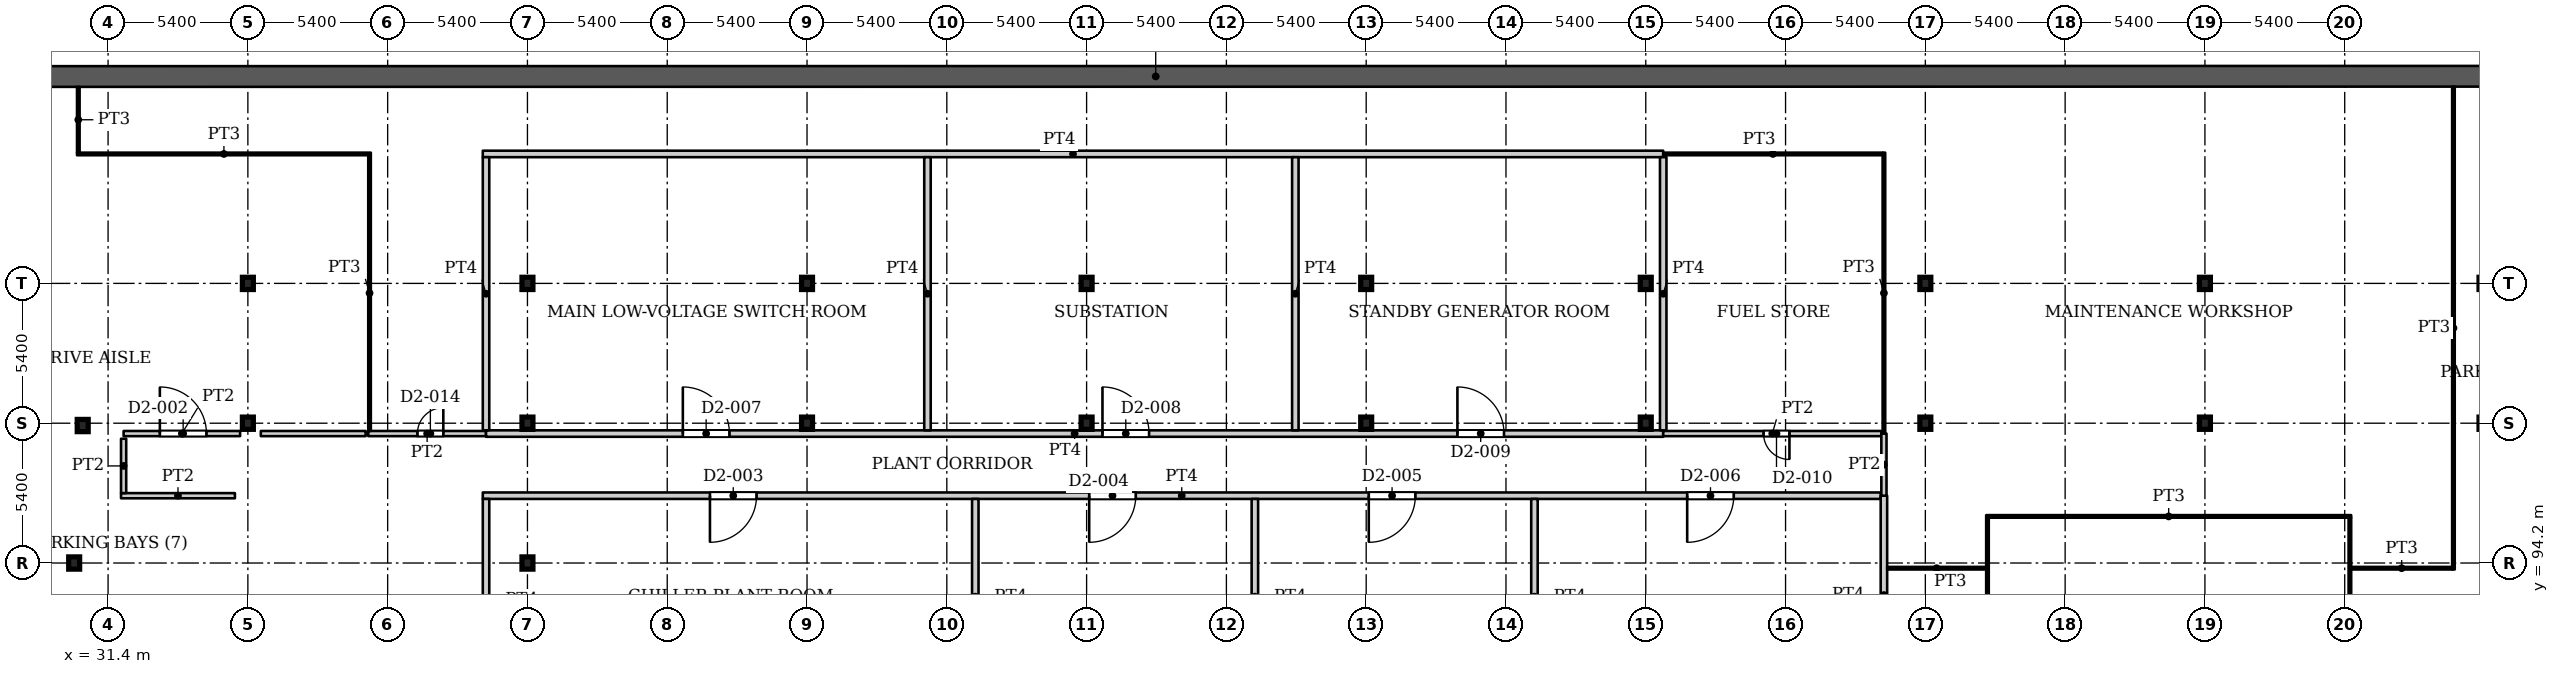
"""IFC4 building model, lengths in metres.
Left out: names, types, materials, properties, quantities, classifications, styles, units other than length and angle.
Written with IfcOpenShell. Run it as: python <this file> out.ifc"""

import sys

from ifc_helpers import new_model, si_unit, direction, frame, frame_2d, origin, origin_2d, place, context, subcontext, project, spatial, rectangle, i_section, extrude, source, transform, mapped, element, fill, save


model = new_model("IFC4")
c1 = context("Model", 3, precision=1e-05, world=origin(), true_north=direction((0.0, 1.0)))
c2 = subcontext(c1, "Body", "Model", "MODEL_VIEW")
j1 = project(units=[si_unit("LENGTHUNIT", "METRE"), si_unit("PLANEANGLEUNIT", "RADIAN")], contexts=[c1])
p1 = place(None, origin())
s1 = spatial("IfcSite", under=j1, at=p1, CompositionType="ELEMENT")
p2 = place(p1, origin())
s2 = spatial("IfcBuilding", under=s1, at=p2, CompositionType="ELEMENT")
p3 = place(p2, frame((0.0, 0.0, -10.0)))
s3 = spatial("IfcBuildingStorey", under=s2, at=p3, CompositionType="ELEMENT", Elevation=-10.0)
for number, where, z_axis, x_axis in (
    (1, (36.8, 99.6, 0.0), (0.0, 0.0, 1.0), (1.0, 0.0, 0.0)),
    (2, (47.6, 99.6, 0.0), (0.0, 0.0, 1.0), (1.0, 0.0, 0.0)),
    (3, (58.4, 99.6, 0.0), (0.0, 0.0, 1.0), (1.0, 0.0, 0.0)),
    (4, (69.2, 99.6, 0.0), (0.0, 0.0, 1.0), (1.0, 0.0, 0.0)),
    (5, (80.0, 99.6, 0.0), (0.0, 0.0, 1.0), (1.0, 0.0, 0.0)),
    (6, (90.8, 99.6, 0.0), (0.0, 0.0, 1.0), (1.0, 0.0, 0.0)),
    (7, (101.6, 99.6, 0.0), (0.0, 0.0, 1.0), (1.0, 0.0, 0.0)),
    (8, (112.4, 99.6, 0.0), (0.0, 0.0, 1.0), (1.0, 0.0, 0.0)),
    (9, (123.2, 99.6, 0.0), (0.0, 0.0, 1.0), (1.0, 0.0, 0.0)),
    (10, (36.8, 105.0, 0.0), (0.0, 0.0, 1.0), (1.0, 0.0, 0.0)),
    (11, (47.6, 105.0, 0.0), (0.0, 0.0, 1.0), (1.0, 0.0, 0.0)),
    (12, (58.4, 105.0, 0.0), (0.0, 0.0, 1.0), (1.0, 0.0, 0.0)),
    (13, (69.2, 105.0, 0.0), (0.0, 0.0, 1.0), (1.0, 0.0, 0.0)),
    (14, (80.0, 105.0, 0.0), (0.0, 0.0, 1.0), (1.0, 0.0, 0.0)),
    (15, (90.8, 105.0, 0.0), (0.0, 0.0, 1.0), (1.0, 0.0, 0.0)),
    (16, (101.6, 105.0, 0.0), (0.0, 0.0, 1.0), (1.0, 0.0, 0.0)),
    (17, (112.4, 105.0, 0.0), (0.0, 0.0, 1.0), (1.0, 0.0, 0.0)),
    (18, (123.2, 105.0, 0.0), (0.0, 0.0, 1.0), (1.0, 0.0, 0.0)),
    (19, (30.09, 94.2, 0.0), (0.0, 0.0, 1.0), (1.0, 0.0, 0.0)),
    (20, (47.6, 94.2, 0.0), (0.0, 0.0, 1.0), (1.0, 0.0, 0.0)),
    (21, (30.42, 99.51, 0.0), (0.0, 0.0, 1.0), (1.0, 0.0, 0.0)),
):
    element("IfcColumn", number, at=place(p3, frame(where, z_axis=z_axis, x_axis=x_axis)), inside=s3, PredefinedType="COLUMN", context=c2, shape_type="SweptSolid", body=[
        extrude(i_section(OverallWidth=0.424, OverallDepth=0.474, WebThickness=0.048, FlangeThickness=0.077, FilletRadius=0.014, at=origin_2d()), origin(), (0.0, 0.0, 1.0), 5.0),
    ])
p4 = place(p3, frame((17.739, 112.989, 0.0), z_axis=(0.0, 0.0, 1.0), x_axis=(0.999999994851, 0.000101480029, 0.0)))
e22 = element("IfcWall", 22, at=p4, inside=s3, PredefinedType="SOLIDWALL", context=c2, shape_type="SweptSolid", body=[
    extrude(rectangle(XDim=108.261, YDim=0.8, at=frame_2d((54.13, 0.0))), origin(), (0.0, 0.0, 1.0), 5.0),
])
p5 = place(p3, frame((30.2, 110.0, 0.0), z_axis=(0.0, 0.0, 1.0), x_axis=(1.0, 0.0, 0.0)))
e23 = element("IfcWall", 23, at=p5, inside=s3, PredefinedType="PARTITIONING", context=c2, shape_type="SweptSolid", body=[
    extrude(rectangle(XDim=11.35, YDim=0.1, at=frame_2d((5.675, 0.0))), origin(), (0.0, 0.0, 1.0), 4.58),
])
p6 = place(p3, frame((30.25, 110.05, 0.0), z_axis=(0.0, 0.0, 1.0), x_axis=(0.0, 1.0, 0.0)))
e24 = element("IfcWall", 24, at=p6, inside=s3, PredefinedType="PARTITIONING", context=c2, shape_type="SweptSolid", body=[
    extrude(rectangle(XDim=2.541, YDim=0.1, at=frame_2d((1.271, 0.0))), origin(), (0.0, 0.0, 1.0), 4.58),
])
p7 = place(p3, frame((31.9, 96.8, 0.0), z_axis=(0.0, 0.0, 1.0), x_axis=(1.0, 0.0, 0.0)))
e25 = element("IfcWall", 25, at=p7, inside=s3, PredefinedType="PARTITIONING", context=c2, shape_type="SweptSolid", body=[
    extrude(rectangle(XDim=4.4, YDim=0.2, at=frame_2d((2.2, 0.0))), origin(), (0.0, 0.0, 1.0), 4.58),
])
p8 = place(p3, frame((32.0, 96.9, 0.0), z_axis=(0.0, 0.0, 1.0), x_axis=(0.0, 1.0, 0.0)))
e26 = element("IfcWall", 26, at=p8, inside=s3, PredefinedType="PARTITIONING", context=c2, shape_type="SweptSolid", body=[
    extrude(rectangle(XDim=2.1, YDim=0.2, at=frame_2d((1.05, 0.0))), origin(), (0.0, 0.0, 1.0), 4.58),
])
p9 = place(p3, frame((32.0, 99.2, 0.0), z_axis=(0.0, 0.0, 1.0), x_axis=(1.0, 0.0, 0.0)))
e27 = element("IfcWall", 27, at=p9, inside=s3, PredefinedType="PARTITIONING", context=c2, shape_type="SweptSolid", body=[
    extrude(rectangle(XDim=4.5, YDim=0.2, at=frame_2d((2.25, 0.0))), origin(), (0.0, 0.0, 1.0), 4.58),
])
p10 = place(p9, frame((1.4, 0.0, 0.0)))
e28 = element("IfcOpeningElement", 28, at=p10, cuts=e27, PredefinedType="OPENING", context=c2, shape_type="SweptSolid", body=[
    extrude(rectangle(XDim=1.8, YDim=2.1, at=frame_2d((0.9, 1.05))), frame((0.0, 0.11, 0.0), z_axis=(0.0, -1.0, 0.0), x_axis=(1.0, 0.0, 0.0)), (0.0, 0.0, 1.0), 0.22),
])
p11 = place(p3, frame((37.3, 99.2, 0.0), z_axis=(0.0, 0.0, 1.0), x_axis=(1.0, 0.0, 0.0)))
e29 = element("IfcWall", 29, at=p11, inside=s3, PredefinedType="PARTITIONING", context=c2, shape_type="SweptSolid", body=[
    extrude(rectangle(XDim=4.05, YDim=0.2, at=frame_2d((2.025, 0.0))), origin(), (0.0, 0.0, 1.0), 4.58),
])
p12 = place(p3, frame((41.45, 99.2, 0.0), z_axis=(0.0, 0.0, 1.0), x_axis=(1.0, 0.0, 0.0)))
e30 = element("IfcWall", 30, at=p12, inside=s3, PredefinedType="PARTITIONING", context=c2, shape_type="SweptSolid", body=[
    extrude(rectangle(XDim=4.55, YDim=0.2, at=frame_2d((2.275, 0.0))), origin(), (0.0, 0.0, 1.0), 4.58),
])
p13 = place(p12, frame((1.9, 0.0, 0.0)))
e31 = element("IfcOpeningElement", 31, at=p13, cuts=e30, PredefinedType="OPENING", context=c2, shape_type="SweptSolid", body=[
    extrude(rectangle(XDim=1.0, YDim=2.1, at=frame_2d((0.5, 1.05))), frame((0.0, 0.11, 0.0), z_axis=(0.0, -1.0, 0.0), x_axis=(1.0, 0.0, 0.0)), (0.0, 0.0, 1.0), 0.22),
])
p14 = place(p3, frame((41.5, 99.3, 0.0), z_axis=(0.0, 0.0, 1.0), x_axis=(0.0, 1.0, 0.0)))
e32 = element("IfcWall", 32, at=p14, inside=s3, PredefinedType="PARTITIONING", context=c2, shape_type="SweptSolid", body=[
    extrude(rectangle(XDim=10.65, YDim=0.1, at=frame_2d((5.325, 0.0))), origin(), (0.0, 0.0, 1.0), 4.58),
])
p15 = place(p3, frame((45.875, 96.8, 0.0), z_axis=(0.0, 0.0, 1.0), x_axis=(1.0, 0.0, 0.0)))
e33 = element("IfcWall", 33, at=p15, inside=s3, PredefinedType="PARTITIONING", context=c2, shape_type="SweptSolid", body=[
    extrude(rectangle(XDim=54.0, YDim=0.25, at=frame_2d((27.0, 0.0))), origin(), (0.0, 0.0, 1.0), 4.58),
])
p16 = place(p15, frame((8.775, 0.0, 0.0)))
e34 = element("IfcOpeningElement", 34, at=p16, cuts=e33, PredefinedType="OPENING", context=c2, shape_type="SweptSolid", body=[
    extrude(rectangle(XDim=1.8, YDim=2.1, at=frame_2d((0.9, 1.05))), frame((0.0, 0.135, 0.0), z_axis=(0.0, -1.0, 0.0), x_axis=(1.0, 0.0, 0.0)), (0.0, 0.0, 1.0), 0.27),
])
p17 = place(p15, frame((23.425, 0.0, 0.0)))
e35 = element("IfcOpeningElement", 35, at=p17, cuts=e33, PredefinedType="OPENING", context=c2, shape_type="SweptSolid", body=[
    extrude(rectangle(XDim=1.8, YDim=2.1, at=frame_2d((0.9, 1.05))), frame((0.0, 0.135, 0.0), z_axis=(0.0, -1.0, 0.0), x_axis=(1.0, 0.0, 0.0)), (0.0, 0.0, 1.0), 0.27),
])
p18 = place(p15, frame((34.225, 0.0, 0.0)))
e36 = element("IfcOpeningElement", 36, at=p18, cuts=e33, PredefinedType="OPENING", context=c2, shape_type="SweptSolid", body=[
    extrude(rectangle(XDim=1.8, YDim=2.1, at=frame_2d((0.9, 1.05))), frame((0.0, 0.135, 0.0), z_axis=(0.0, -1.0, 0.0), x_axis=(1.0, 0.0, 0.0)), (0.0, 0.0, 1.0), 0.27),
])
p19 = place(p15, frame((46.525, 0.0, 0.0)))
e37 = element("IfcOpeningElement", 37, at=p19, cuts=e33, PredefinedType="OPENING", context=c2, shape_type="SweptSolid", body=[
    extrude(rectangle(XDim=1.8, YDim=2.1, at=frame_2d((0.9, 1.05))), frame((0.0, 0.135, 0.0), z_axis=(0.0, -1.0, 0.0), x_axis=(1.0, 0.0, 0.0)), (0.0, 0.0, 1.0), 0.27),
])
p20 = place(p3, frame((45.875, 110.0, 0.0), z_axis=(0.0, 0.0, 1.0), x_axis=(1.0, 0.0, 0.0)))
e38 = element("IfcWall", 38, at=p20, inside=s3, PredefinedType="PARTITIONING", context=c2, shape_type="SweptSolid", body=[
    extrude(rectangle(XDim=45.599, YDim=0.25, at=frame_2d((22.8, 0.0))), origin(), (0.0, 0.0, 1.0), 4.58),
])
p21 = place(p3, frame((46.0, 88.875, 0.0), z_axis=(0.0, 0.0, 1.0), x_axis=(0.0, 1.0, 0.0)))
e39 = element("IfcWall", 39, at=p21, inside=s3, PredefinedType="PARTITIONING", context=c2, shape_type="SweptSolid", body=[
    extrude(rectangle(XDim=7.8, YDim=0.25, at=frame_2d((3.9, 0.0))), origin(), (0.0, 0.0, 1.0), 4.58),
])
p22 = place(p3, frame((46.0, 99.2, 0.0), z_axis=(0.0, 0.0, 1.0), x_axis=(1.0, 0.0, 0.0)))
e40 = element("IfcWall", 40, at=p22, inside=s3, PredefinedType="PARTITIONING", context=c2, shape_type="SweptSolid", body=[
    extrude(rectangle(XDim=45.474, YDim=0.25, at=frame_2d((22.737, 0.0))), origin(), (0.0, 0.0, 1.0), 4.58),
])
p23 = place(p22, frame((7.603, 0.0, 0.0)))
e41 = element("IfcOpeningElement", 41, at=p23, cuts=e40, PredefinedType="OPENING", context=c2, shape_type="SweptSolid", body=[
    extrude(rectangle(XDim=1.8, YDim=2.1, at=frame_2d((0.9, 1.05))), frame((0.0, 0.135, 0.0), z_axis=(0.0, -1.0, 0.0), x_axis=(1.0, 0.0, 0.0)), (0.0, 0.0, 1.0), 0.27),
])
p24 = place(p22, frame((23.813, 0.0, 0.0)))
e42 = element("IfcOpeningElement", 42, at=p24, cuts=e40, PredefinedType="OPENING", context=c2, shape_type="SweptSolid", body=[
    extrude(rectangle(XDim=1.8, YDim=2.1, at=frame_2d((0.9, 1.05))), frame((0.0, 0.135, 0.0), z_axis=(0.0, -1.0, 0.0), x_axis=(1.0, 0.0, 0.0)), (0.0, 0.0, 1.0), 0.27),
])
p25 = place(p22, frame((37.524, 0.0, 0.0)))
e43 = element("IfcOpeningElement", 43, at=p25, cuts=e40, PredefinedType="OPENING", context=c2, shape_type="SweptSolid", body=[
    extrude(rectangle(XDim=1.8, YDim=2.1, at=frame_2d((0.9, 1.05))), frame((0.0, 0.135, 0.0), z_axis=(0.0, -1.0, 0.0), x_axis=(1.0, 0.0, 0.0)), (0.0, 0.0, 1.0), 0.27),
])
for number, where, z_axis, x_axis in (
    (44, (46.0, 99.325, 0.0), (0.0, 0.0, 1.0), (0.0, 1.0, 0.0)),
    (45, (63.053, 99.325, 0.0), (0.0, 0.0, 1.0), (0.0, 1.0, 0.0)),
):
    element("IfcWall", number, at=place(p3, frame(where, z_axis=z_axis, x_axis=x_axis)), inside=s3, PredefinedType="PARTITIONING", context=c2, shape_type="SweptSolid", body=[
        extrude(rectangle(XDim=10.55, YDim=0.25, at=frame_2d((5.275, 0.0))), origin(), (0.0, 0.0, 1.0), 4.58),
    ])
for number, where, z_axis, x_axis in (
    (46, (64.9, 89.125, 0.0), (0.0, 0.0, 1.0), (0.0, 1.0, 0.0)),
    (47, (75.7, 89.125, 0.0), (0.0, 0.0, 1.0), (0.0, 1.0, 0.0)),
):
    element("IfcWall", number, at=place(p3, frame(where, z_axis=z_axis, x_axis=x_axis)), inside=s3, PredefinedType="PARTITIONING", context=c2, shape_type="SweptSolid", body=[
        extrude(rectangle(XDim=7.55, YDim=0.25, at=frame_2d((3.775, 0.0))), origin(), (0.0, 0.0, 1.0), 4.58),
    ])
p26 = place(p3, frame((77.263, 99.325, 0.0), z_axis=(0.0, 0.0, 1.0), x_axis=(0.0, 1.0, 0.0)))
e48 = element("IfcWall", 48, at=p26, inside=s3, PredefinedType="PARTITIONING", context=c2, shape_type="SweptSolid", body=[
    extrude(rectangle(XDim=10.55, YDim=0.25, at=frame_2d((5.275, 0.0))), origin(), (0.0, 0.0, 1.0), 4.58),
])
p27 = place(p3, frame((86.5, 89.125, 0.0), z_axis=(0.0, 0.0, 1.0), x_axis=(0.0, 1.0, 0.0)))
e49 = element("IfcWall", 49, at=p27, inside=s3, PredefinedType="PARTITIONING", context=c2, shape_type="SweptSolid", body=[
    extrude(rectangle(XDim=7.55, YDim=0.25, at=frame_2d((3.775, 0.0))), origin(), (0.0, 0.0, 1.0), 4.58),
])
p28 = place(p3, frame((91.474, 99.2, 0.0), z_axis=(0.0, 0.0, 1.0), x_axis=(1.0, 0.0, 0.0)))
e50 = element("IfcWall", 50, at=p28, inside=s3, PredefinedType="PARTITIONING", context=c2, shape_type="SweptSolid", body=[
    extrude(rectangle(XDim=8.426, YDim=0.2, at=frame_2d((4.213, 0.0))), origin(), (0.0, 0.0, 1.0), 4.58),
])
p29 = place(p28, frame((3.876, 0.0, 0.0)))
e51 = element("IfcOpeningElement", 51, at=p29, cuts=e50, PredefinedType="OPENING", context=c2, shape_type="SweptSolid", body=[
    extrude(rectangle(XDim=1.0, YDim=2.1, at=frame_2d((0.5, 1.05))), frame((0.0, 0.11, 0.0), z_axis=(0.0, -1.0, 0.0), x_axis=(1.0, 0.0, 0.0)), (0.0, 0.0, 1.0), 0.22),
])
p30 = place(p3, frame((91.474, 99.325, 0.0), z_axis=(0.0, 0.0, 1.0), x_axis=(0.0, 1.0, 0.0)))
e52 = element("IfcWall", 52, at=p30, inside=s3, PredefinedType="PARTITIONING", context=c2, shape_type="SweptSolid", body=[
    extrude(rectangle(XDim=10.55, YDim=0.25, at=frame_2d((5.275, 0.0))), origin(), (0.0, 0.0, 1.0), 4.58),
])
p31 = place(p3, frame((91.474, 110.0, 0.0), z_axis=(0.0, 0.0, 1.0), x_axis=(1.0, 0.0, 0.0)))
e53 = element("IfcWall", 53, at=p31, inside=s3, PredefinedType="PARTITIONING", context=c2, shape_type="SweptSolid", body=[
    extrude(rectangle(XDim=8.476, YDim=0.1, at=frame_2d((4.238, 0.0))), origin(), (0.0, 0.0, 1.0), 4.58),
])
p32 = place(p3, frame((100.0, 89.125, 0.0), z_axis=(0.0, 0.0, 1.0), x_axis=(0.0, 1.0, 0.0)))
e54 = element("IfcWall", 54, at=p32, inside=s3, PredefinedType="PARTITIONING", context=c2, shape_type="SweptSolid", body=[
    extrude(rectangle(XDim=7.675, YDim=0.25, at=frame_2d((3.837, 0.0))), origin(), (0.0, 0.0, 1.0), 4.58),
])
p33 = place(p3, frame((100.0, 96.8, 0.0), z_axis=(0.0, 0.0, 1.0), x_axis=(0.0, 1.0, 0.0)))
e55 = element("IfcWall", 55, at=p33, inside=s3, PredefinedType="PARTITIONING", context=c2, shape_type="SweptSolid", body=[
    extrude(rectangle(XDim=2.4, YDim=0.2, at=frame_2d((1.2, 0.0))), origin(), (0.0, 0.0, 1.0), 4.58),
])
p34 = place(p3, frame((100.0, 99.2, 0.0), z_axis=(0.0, 0.0, 1.0), x_axis=(0.0, 1.0, 0.0)))
e56 = element("IfcWall", 56, at=p34, inside=s3, PredefinedType="PARTITIONING", context=c2, shape_type="SweptSolid", body=[
    extrude(rectangle(XDim=10.85, YDim=0.1, at=frame_2d((5.425, 0.0))), origin(), (0.0, 0.0, 1.0), 4.58),
])
p35 = place(p3, frame((100.125, 94.0, 0.0), z_axis=(0.0, 0.0, 1.0), x_axis=(1.0, 0.0, 0.0)))
e57 = element("IfcWall", 57, at=p35, inside=s3, PredefinedType="PARTITIONING", context=c2, shape_type="SweptSolid", body=[
    extrude(rectangle(XDim=3.825, YDim=0.1, at=frame_2d((1.913, 0.0))), origin(), (0.0, 0.0, 1.0), 4.58),
])
p36 = place(p3, frame((103.95, 96.0, 0.0), z_axis=(0.0, 0.0, 1.0), x_axis=(1.0, 0.0, 0.0)))
e58 = element("IfcWall", 58, at=p36, inside=s3, PredefinedType="PARTITIONING", context=c2, shape_type="SweptSolid", body=[
    extrude(rectangle(XDim=14.1, YDim=0.1, at=frame_2d((7.05, 0.0))), origin(), (0.0, 0.0, 1.0), 4.58),
])
p37 = place(p3, frame((104.0, 89.05, 0.0), z_axis=(0.0, 0.0, 1.0), x_axis=(0.0, 1.0, 0.0)))
e59 = element("IfcWall", 59, at=p37, inside=s3, PredefinedType="PARTITIONING", context=c2, shape_type="SweptSolid", body=[
    extrude(rectangle(XDim=6.9, YDim=0.1, at=frame_2d((3.45, 0.0))), origin(), (0.0, 0.0, 1.0), 4.58),
])
p38 = place(p3, frame((118.0, 88.95, 0.0), z_axis=(0.0, 0.0, 1.0), x_axis=(0.0, 1.0, 0.0)))
e60 = element("IfcWall", 60, at=p38, inside=s3, PredefinedType="PARTITIONING", context=c2, shape_type="SweptSolid", body=[
    extrude(rectangle(XDim=7.0, YDim=0.1, at=frame_2d((3.5, 0.0))), origin(), (0.0, 0.0, 1.0), 4.58),
])
p39 = place(p3, frame((118.05, 94.0, 0.0), z_axis=(0.0, 0.0, 1.0), x_axis=(1.0, 0.0, 0.0)))
e61 = element("IfcWall", 61, at=p39, inside=s3, PredefinedType="PARTITIONING", context=c2, shape_type="SweptSolid", body=[
    extrude(rectangle(XDim=3.9, YDim=0.1, at=frame_2d((1.95, 0.0))), origin(), (0.0, 0.0, 1.0), 4.58),
])
p40 = place(p3, frame((122.0, 93.95, 0.0), z_axis=(0.0, 0.0, 1.0), x_axis=(0.0, 1.0, 0.0)))
e62 = element("IfcWall", 62, at=p40, inside=s3, PredefinedType="PARTITIONING", context=c2, shape_type="SweptSolid", body=[
    extrude(rectangle(XDim=18.651, YDim=0.1, at=frame_2d((9.326, 0.0))), origin(), (0.0, 0.0, 1.0), 4.58),
])
m1 = source(origin(), c2, "Body", "SweptSolid", [
    extrude(rectangle(XDim=1.8, YDim=2.1, at=frame_2d((0.9, 1.05))), frame((0.0, 0.025, 0.0), z_axis=(0.0, -1.0, 0.0), x_axis=(1.0, 0.0, 0.0)), (0.0, 0.0, 1.0), 0.05),
])
p41 = place(p10, origin())
e63 = element("IfcDoor", 63, at=p41, inside=s3, OperationType="DOUBLE_DOOR_SINGLE_SWING", PredefinedType="DOOR", context=c2, shape_type="MappedRepresentation", body=[
    mapped(m1, transform((0.0, 0.0, 0.0), x_axis=(1.0, 0.0, 0.0), y_axis=(0.0, 1.0, 0.0), z_axis=(0.0, 0.0, 1.0), scale=1.0)),
])
fill(e28, e63)
m2 = source(origin(), c2, "Body", "SweptSolid", [
    extrude(rectangle(XDim=1.8, YDim=2.1, at=frame_2d((0.9, 1.05))), frame((0.0, 0.025, 0.0), z_axis=(0.0, -1.0, 0.0), x_axis=(1.0, 0.0, 0.0)), (0.0, 0.0, 1.0), 0.05),
])
p42 = place(p16, origin())
e64 = element("IfcDoor", 64, at=p42, inside=s3, OperationType="DOUBLE_DOOR_SINGLE_SWING", PredefinedType="DOOR", context=c2, shape_type="MappedRepresentation", body=[
    mapped(m2, transform((0.0, 0.0, 0.0), x_axis=(1.0, 0.0, 0.0), y_axis=(0.0, 1.0, 0.0), z_axis=(0.0, 0.0, 1.0), scale=1.0)),
])
fill(e34, e64)
p43 = place(p17, origin())
e65 = element("IfcDoor", 65, at=p43, inside=s3, OperationType="DOUBLE_DOOR_SINGLE_SWING", PredefinedType="DOOR", context=c2, shape_type="MappedRepresentation", body=[
    mapped(m2, transform((0.0, 0.0, 0.0), x_axis=(1.0, 0.0, 0.0), y_axis=(0.0, 1.0, 0.0), z_axis=(0.0, 0.0, 1.0), scale=1.0)),
])
fill(e35, e65)
p44 = place(p18, origin())
e66 = element("IfcDoor", 66, at=p44, inside=s3, OperationType="DOUBLE_DOOR_SINGLE_SWING", PredefinedType="DOOR", context=c2, shape_type="MappedRepresentation", body=[
    mapped(m2, transform((0.0, 0.0, 0.0), x_axis=(1.0, 0.0, 0.0), y_axis=(0.0, 1.0, 0.0), z_axis=(0.0, 0.0, 1.0), scale=1.0)),
])
fill(e36, e66)
p45 = place(p19, origin())
e67 = element("IfcDoor", 67, at=p45, inside=s3, OperationType="DOUBLE_DOOR_SINGLE_SWING", PredefinedType="DOOR", context=c2, shape_type="MappedRepresentation", body=[
    mapped(m2, transform((0.0, 0.0, 0.0), x_axis=(1.0, 0.0, 0.0), y_axis=(0.0, 1.0, 0.0), z_axis=(0.0, 0.0, 1.0), scale=1.0)),
])
fill(e37, e67)
p46 = place(p23, origin())
e68 = element("IfcDoor", 68, at=p46, inside=s3, OperationType="DOUBLE_DOOR_SINGLE_SWING", PredefinedType="DOOR", context=c2, shape_type="MappedRepresentation", body=[
    mapped(m2, transform((0.0, 0.0, 0.0), x_axis=(1.0, 0.0, 0.0), y_axis=(0.0, 1.0, 0.0), z_axis=(0.0, 0.0, 1.0), scale=1.0)),
])
fill(e41, e68)
p47 = place(p24, origin())
e69 = element("IfcDoor", 69, at=p47, inside=s3, OperationType="DOUBLE_DOOR_SINGLE_SWING", PredefinedType="DOOR", context=c2, shape_type="MappedRepresentation", body=[
    mapped(m2, transform((0.0, 0.0, 0.0), x_axis=(1.0, 0.0, 0.0), y_axis=(0.0, 1.0, 0.0), z_axis=(0.0, 0.0, 1.0), scale=1.0)),
])
fill(e42, e69)
p48 = place(p25, origin())
e70 = element("IfcDoor", 70, at=p48, inside=s3, OperationType="DOUBLE_DOOR_SINGLE_SWING", PredefinedType="DOOR", context=c2, shape_type="MappedRepresentation", body=[
    mapped(m2, transform((0.0, 0.0, 0.0), x_axis=(1.0, 0.0, 0.0), y_axis=(0.0, 1.0, 0.0), z_axis=(0.0, 0.0, 1.0), scale=1.0)),
])
fill(e43, e70)
m3 = source(origin(), c2, "Body", "SweptSolid", [
    extrude(rectangle(XDim=1.0, YDim=2.1, at=frame_2d((0.5, 1.05))), frame((0.0, 0.025, 0.0), z_axis=(0.0, -1.0, 0.0), x_axis=(1.0, 0.0, 0.0)), (0.0, 0.0, 1.0), 0.05),
])
p49 = place(p29, origin())
e71 = element("IfcDoor", 71, at=p49, inside=s3, OperationType="SINGLE_SWING_RIGHT", PredefinedType="DOOR", context=c2, shape_type="MappedRepresentation", body=[
    mapped(m3, transform((0.0, 0.0, 0.0), x_axis=(1.0, 0.0, 0.0), y_axis=(0.0, 1.0, 0.0), z_axis=(0.0, 0.0, 1.0), scale=1.0)),
])
fill(e51, e71)
p50 = place(p13, origin())
e72 = element("IfcDoor", 72, at=p50, inside=s3, OperationType="SINGLE_SWING_LEFT", PredefinedType="DOOR", context=c2, shape_type="MappedRepresentation", body=[
    mapped(m3, transform((0.0, 0.0, 0.0), x_axis=(1.0, 0.0, 0.0), y_axis=(0.0, 1.0, 0.0), z_axis=(0.0, 0.0, 1.0), scale=1.0)),
])
fill(e31, e72)
save(model, sys.argv[1])
